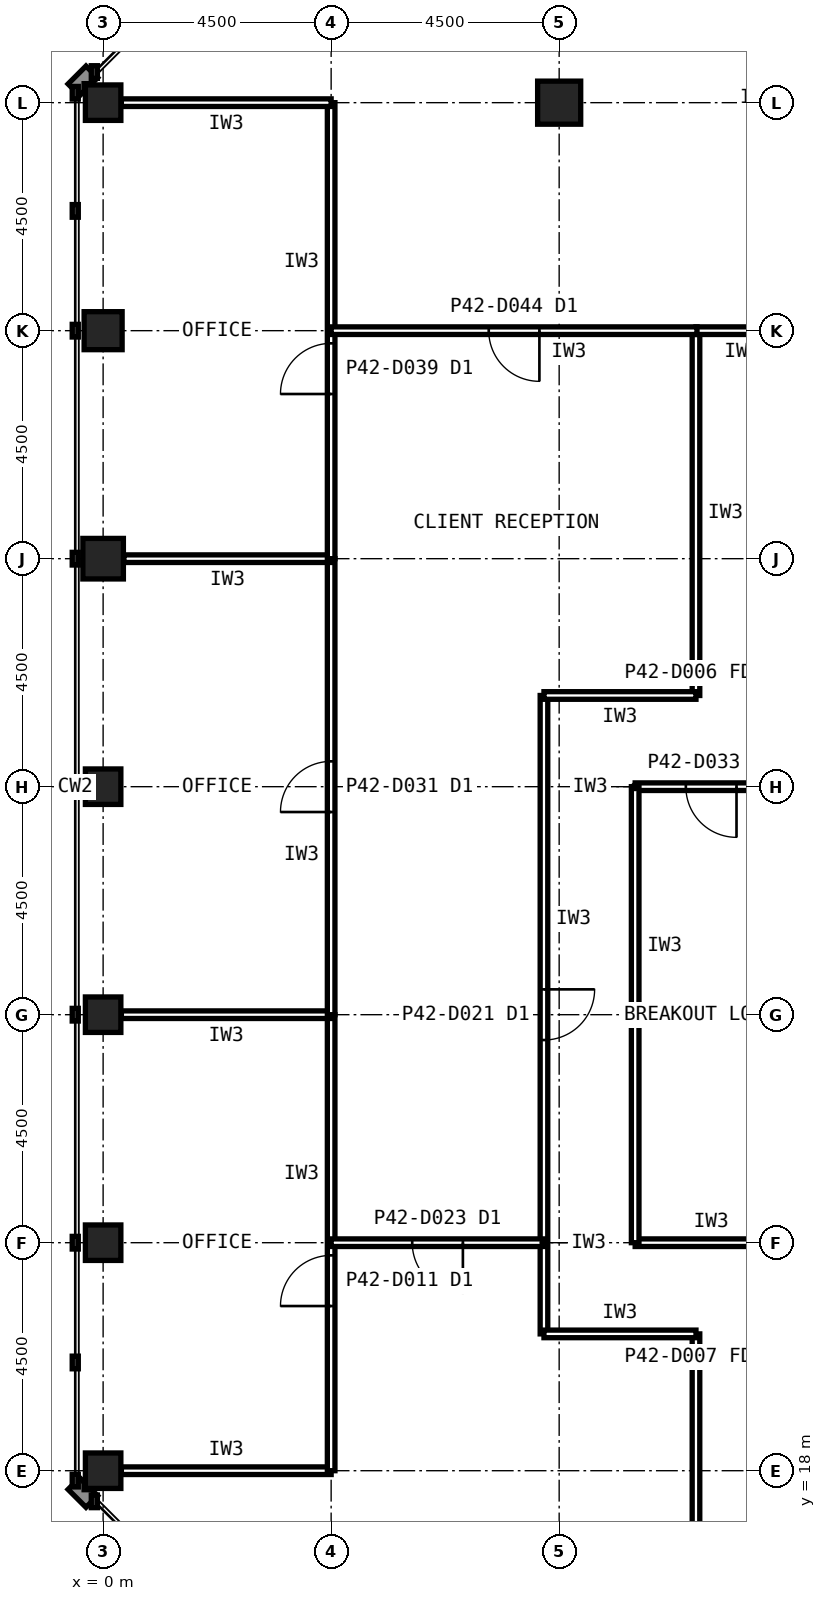
"""IFC4 building model, lengths in metres.
Left out: names, types, materials, properties, quantities, classifications, styles, units other than length and angle.
Written with IfcOpenShell. Run it as: python <this file> out.ifc"""

import sys

from ifc_helpers import new_model, si_unit, direction, frame, frame_2d, origin, origin_2d, place, context, subcontext, project, spatial, rectangle, hollow_rectangle, extrude, element, fill, save


model = new_model("IFC4")
c1 = context("Model", 3, precision=1e-05, world=origin(), true_north=direction((0.0, 1.0)))
c2 = subcontext(c1, "Body", "Model", "MODEL_VIEW")
j1 = project(units=[si_unit("LENGTHUNIT", "METRE"), si_unit("PLANEANGLEUNIT", "RADIAN")], contexts=[c1])
p1 = place(None, origin())
s1 = spatial("IfcSite", under=j1, at=p1, CompositionType="ELEMENT")
p2 = place(p1, origin())
s2 = spatial("IfcBuilding", under=s1, at=p2, CompositionType="ELEMENT")
p3 = place(p2, frame((0.0, 0.0, 175.6)))
s3 = spatial("IfcBuildingStorey", under=s2, at=p3, CompositionType="ELEMENT", Elevation=175.6)
p4 = place(p3, frame((0.0, 45.0, 0.0), z_axis=(0.0, 0.0, 1.0), x_axis=(1.0, 0.0, 0.0)))
e1 = element("IfcColumn", 1, at=p4, inside=s3, PredefinedType="COLUMN", context=c2, shape_type="SweptSolid", body=[
    extrude(hollow_rectangle(XDim=0.7, YDim=0.7, WallThickness=0.036, at=origin_2d()), origin(), (0.0, 0.0, 1.0), 4.0),
])
p5 = place(p3, frame((0.0, 40.5, 0.0), z_axis=(0.0, 0.0, 1.0), x_axis=(1.0, 0.0, 0.0)))
e2 = element("IfcColumn", 2, at=p5, inside=s3, PredefinedType="COLUMN", context=c2, shape_type="SweptSolid", body=[
    extrude(hollow_rectangle(XDim=0.75, YDim=0.75, WallThickness=0.04, at=origin_2d()), origin(), (0.0, 0.0, 1.0), 4.0),
])
p6 = place(p3, frame((0.0, 36.0, 0.0), z_axis=(0.0, 0.0, 1.0), x_axis=(1.0, 0.0, 0.0)))
e3 = element("IfcColumn", 3, at=p6, inside=s3, PredefinedType="COLUMN", context=c2, shape_type="SweptSolid", body=[
    extrude(hollow_rectangle(XDim=0.8, YDim=0.8, WallThickness=0.045, at=origin_2d()), origin(), (0.0, 0.0, 1.0), 4.0),
])
for number, where, z_axis, x_axis in (
    (4, (0.0, 31.5, 0.0), (0.0, 0.0, 1.0), (1.0, 0.0, 0.0)),
    (5, (0.0, 27.0, 0.0), (0.0, 0.0, 1.0), (1.0, 0.0, 0.0)),
    (6, (0.0, 22.5, 0.0), (0.0, 0.0, 1.0), (1.0, 0.0, 0.0)),
    (7, (0.0, 18.0, 0.0), (0.0, 0.0, 1.0), (1.0, 0.0, 0.0)),
):
    element("IfcColumn", number, at=place(p3, frame(where, z_axis=z_axis, x_axis=x_axis)), inside=s3, PredefinedType="COLUMN", context=c2, shape_type="SweptSolid", body=[
        extrude(hollow_rectangle(XDim=0.7, YDim=0.7, WallThickness=0.036, at=origin_2d()), origin(), (0.0, 0.0, 1.0), 4.0),
    ])
p7 = place(p3, frame((9.0, 45.0, 0.0), z_axis=(0.0, 0.0, 1.0), x_axis=(1.0, 0.0, 0.0)))
e8 = element("IfcColumn", 8, at=p7, inside=s3, PredefinedType="COLUMN", context=c2, shape_type="SweptSolid", body=[
    extrude(hollow_rectangle(XDim=0.85, YDim=0.85, WallThickness=0.05, at=origin_2d()), origin(), (0.0, 0.0, 1.0), 4.0),
])
p8 = place(p3, frame((8.7, 33.3, 0.0), z_axis=(0.0, 0.0, 1.0), x_axis=(0.0, -1.0, 0.0)))
e9 = element("IfcWall", 9, at=p8, inside=s3, PredefinedType="PARTITIONING", context=c2, shape_type="SweptSolid", body=[
    extrude(rectangle(XDim=12.6, YDim=0.15, at=frame_2d((6.3, 0.0))), origin(), (0.0, 0.0, 1.0), 3.84),
])
p9 = place(p8, frame((5.8, 0.0, 0.0)))
e10 = element("IfcOpeningElement", 10, at=p9, cuts=e9, PredefinedType="OPENING", context=c2, shape_type="SweptSolid", body=[
    extrude(rectangle(XDim=1.0, YDim=2.1, at=frame_2d((0.5, 1.05))), frame((0.0, 0.085, 0.0), z_axis=(0.0, -1.0, 0.0), x_axis=(1.0, 0.0, 0.0)), (0.0, 0.0, 1.0), 0.17),
])
p10 = place(p3, frame((11.7, 20.7, 0.0), z_axis=(0.0, 0.0, 1.0), x_axis=(0.0, -1.0, 0.0)))
e11 = element("IfcWall", 11, at=p10, inside=s3, PredefinedType="PARTITIONING", context=c2, shape_type="SweptSolid", body=[
    extrude(rectangle(XDim=9.0, YDim=0.15, at=frame_2d((4.5, 0.0))), origin(), (0.0, 0.0, 1.0), 3.84),
])
p11 = place(p3, frame((11.7, 40.5, 0.0), z_axis=(0.0, 0.0, 1.0), x_axis=(0.0, -1.0, 0.0)))
e12 = element("IfcWall", 12, at=p11, inside=s3, PredefinedType="PARTITIONING", context=c2, shape_type="SweptSolid", body=[
    extrude(rectangle(XDim=7.2, YDim=0.15, at=frame_2d((3.6, 0.0))), origin(), (0.0, 0.0, 1.0), 3.84),
])
for number, where, z_axis, x_axis in (
    (13, (8.7, 20.7, 0.0), (0.0, 0.0, 1.0), (1.0, 0.0, 0.0)),
    (14, (11.7, 33.3, 0.0), (0.0, 0.0, 1.0), (-1.0, 0.0, 0.0)),
):
    element("IfcWall", number, at=place(p3, frame(where, z_axis=z_axis, x_axis=x_axis)), inside=s3, PredefinedType="PARTITIONING", context=c2, shape_type="SweptSolid", body=[
        extrude(rectangle(XDim=3.0, YDim=0.15, at=frame_2d((1.5, 0.0))), origin(), (0.0, 0.0, 1.0), 3.84),
    ])
p12 = place(p3, frame((13.51, 40.5, 0.0), z_axis=(0.0, 0.0, 1.0), x_axis=(-1.0, 0.0, 0.0)))
e15 = element("IfcWall", 15, at=p12, inside=s3, PredefinedType="PARTITIONING", context=c2, shape_type="SweptSolid", body=[
    extrude(rectangle(XDim=1.81, YDim=0.15, at=frame_2d((0.905, 0.0))), origin(), (0.0, 0.0, 1.0), 2.989),
])
p13 = place(p3, frame((0.36, 18.0, 0.0), z_axis=(0.0, 0.0, 1.0), x_axis=(1.0, 0.0, 0.0)))
e16 = element("IfcWall", 16, at=p13, inside=s3, PredefinedType="PARTITIONING", context=c2, shape_type="SweptSolid", body=[
    extrude(rectangle(XDim=4.14, YDim=0.15, at=frame_2d((2.07, 0.0))), origin(), (0.0, 0.0, 1.0), 2.989),
])
p14 = place(p3, frame((4.5, 18.0, 0.0), z_axis=(0.0, 0.0, 1.0), x_axis=(0.0, 1.0, 0.0)))
e17 = element("IfcWall", 17, at=p14, inside=s3, PredefinedType="PARTITIONING", context=c2, shape_type="SweptSolid", body=[
    extrude(rectangle(XDim=9.0, YDim=0.15, at=frame_2d((4.5, 0.0))), origin(), (0.0, 0.0, 1.0), 3.84),
])
p15 = place(p14, frame((3.25, 0.0, 0.0)))
e18 = element("IfcOpeningElement", 18, at=p15, cuts=e17, PredefinedType="OPENING", context=c2, shape_type="SweptSolid", body=[
    extrude(rectangle(XDim=1.0, YDim=2.1, at=frame_2d((0.5, 1.05))), frame((0.0, 0.085, 0.0), z_axis=(0.0, -1.0, 0.0), x_axis=(1.0, 0.0, 0.0)), (0.0, 0.0, 1.0), 0.17),
])
p16 = place(p3, frame((4.5, 27.0, 0.0), z_axis=(0.0, 0.0, 1.0), x_axis=(-1.0, 0.0, 0.0)))
e19 = element("IfcWall", 19, at=p16, inside=s3, PredefinedType="PARTITIONING", context=c2, shape_type="SweptSolid", body=[
    extrude(rectangle(XDim=4.14, YDim=0.15, at=frame_2d((2.07, 0.0))), origin(), (0.0, 0.0, 1.0), 2.989),
])
p17 = place(p3, frame((4.5, 27.0, 0.0), z_axis=(0.0, 0.0, 1.0), x_axis=(0.0, 1.0, 0.0)))
e20 = element("IfcWall", 20, at=p17, inside=s3, PredefinedType="PARTITIONING", context=c2, shape_type="SweptSolid", body=[
    extrude(rectangle(XDim=9.0, YDim=0.15, at=frame_2d((4.5, 0.0))), origin(), (0.0, 0.0, 1.0), 3.84),
])
p18 = place(p17, frame((4.0, 0.0, 0.0)))
e21 = element("IfcOpeningElement", 21, at=p18, cuts=e20, PredefinedType="OPENING", context=c2, shape_type="SweptSolid", body=[
    extrude(rectangle(XDim=1.0, YDim=2.1, at=frame_2d((0.5, 1.05))), frame((0.0, 0.085, 0.0), z_axis=(0.0, -1.0, 0.0), x_axis=(1.0, 0.0, 0.0)), (0.0, 0.0, 1.0), 0.17),
])
p19 = place(p3, frame((4.5, 36.0, 0.0), z_axis=(0.0, 0.0, 1.0), x_axis=(-1.0, 0.0, 0.0)))
e22 = element("IfcWall", 22, at=p19, inside=s3, PredefinedType="PARTITIONING", context=c2, shape_type="SweptSolid", body=[
    extrude(rectangle(XDim=4.09, YDim=0.15, at=frame_2d((2.045, 0.0))), origin(), (0.0, 0.0, 1.0), 2.989),
])
p20 = place(p3, frame((4.5, 36.0, 0.0), z_axis=(0.0, 0.0, 1.0), x_axis=(0.0, 1.0, 0.0)))
e23 = element("IfcWall", 23, at=p20, inside=s3, PredefinedType="PARTITIONING", context=c2, shape_type="SweptSolid", body=[
    extrude(rectangle(XDim=9.0, YDim=0.15, at=frame_2d((4.5, 0.0))), origin(), (0.0, 0.0, 1.0), 3.84),
])
p21 = place(p20, frame((3.25, 0.0, 0.0)))
e24 = element("IfcOpeningElement", 24, at=p21, cuts=e23, PredefinedType="OPENING", context=c2, shape_type="SweptSolid", body=[
    extrude(rectangle(XDim=1.0, YDim=2.1, at=frame_2d((0.5, 1.05))), frame((0.0, 0.085, 0.0), z_axis=(0.0, -1.0, 0.0), x_axis=(1.0, 0.0, 0.0)), (0.0, 0.0, 1.0), 0.17),
])
p22 = place(p3, frame((4.5, 45.0, 0.0), z_axis=(0.0, 0.0, 1.0), x_axis=(-1.0, 0.0, 0.0)))
e25 = element("IfcWall", 25, at=p22, inside=s3, PredefinedType="PARTITIONING", context=c2, shape_type="SweptSolid", body=[
    extrude(rectangle(XDim=4.14, YDim=0.15, at=frame_2d((2.07, 0.0))), origin(), (0.0, 0.0, 1.0), 3.229),
])
p23 = place(p3, frame((10.5, 22.5, 0.0), z_axis=(0.0, 0.0, 1.0), x_axis=(1.0, 0.0, 0.0)))
e26 = element("IfcWall", 26, at=p23, inside=s3, PredefinedType="PARTITIONING", context=c2, shape_type="SweptSolid", body=[
    extrude(rectangle(XDim=3.0, YDim=0.15, at=frame_2d((1.5, 0.0))), origin(), (0.0, 0.0, 1.0), 2.989),
])
p24 = place(p3, frame((13.5, 31.5, 0.0), z_axis=(0.0, 0.0, 1.0), x_axis=(-1.0, 0.0, 0.0)))
e27 = element("IfcWall", 27, at=p24, inside=s3, PredefinedType="PARTITIONING", context=c2, shape_type="SweptSolid", body=[
    extrude(rectangle(XDim=3.0, YDim=0.15, at=frame_2d((1.5, 0.0))), origin(), (0.0, 0.0, 1.0), 2.989),
])
p25 = place(p24, frame((1.0, 0.0, 0.0)))
e28 = element("IfcOpeningElement", 28, at=p25, cuts=e27, PredefinedType="OPENING", context=c2, shape_type="SweptSolid", body=[
    extrude(rectangle(XDim=1.0, YDim=2.1, at=frame_2d((0.5, 1.05))), frame((0.0, 0.085, 0.0), z_axis=(0.0, -1.0, 0.0), x_axis=(1.0, 0.0, 0.0)), (0.0, 0.0, 1.0), 0.17),
])
p26 = place(p3, frame((10.5, 31.5, 0.0), z_axis=(0.0, 0.0, 1.0), x_axis=(0.0, -1.0, 0.0)))
e29 = element("IfcWall", 29, at=p26, inside=s3, PredefinedType="PARTITIONING", context=c2, shape_type="SweptSolid", body=[
    extrude(rectangle(XDim=9.0, YDim=0.15, at=frame_2d((4.5, 0.0))), origin(), (0.0, 0.0, 1.0), 3.84),
])
p27 = place(p3, frame((11.72, 40.5, 0.0), z_axis=(0.0, 0.0, 1.0), x_axis=(-1.0, 0.0, 0.0)))
e30 = element("IfcWall", 30, at=p27, inside=s3, PredefinedType="PARTITIONING", context=c2, shape_type="SweptSolid", body=[
    extrude(rectangle(XDim=7.22, YDim=0.15, at=frame_2d((3.61, 0.0))), origin(), (0.0, 0.0, 1.0), 2.989),
])
p28 = place(p27, frame((3.11, 0.0, 0.0)))
e31 = element("IfcOpeningElement", 31, at=p28, cuts=e30, PredefinedType="OPENING", context=c2, shape_type="SweptSolid", body=[
    extrude(rectangle(XDim=1.0, YDim=2.1, at=frame_2d((0.5, 1.05))), frame((0.0, 0.085, 0.0), z_axis=(0.0, -1.0, 0.0), x_axis=(1.0, 0.0, 0.0)), (0.0, 0.0, 1.0), 0.17),
])
p29 = place(p3, frame((8.7, 22.5, 0.0), z_axis=(0.0, 0.0, 1.0), x_axis=(-1.0, 0.0, 0.0)))
e32 = element("IfcWall", 32, at=p29, inside=s3, PredefinedType="PARTITIONING", context=c2, shape_type="SweptSolid", body=[
    extrude(rectangle(XDim=4.2, YDim=0.15, at=frame_2d((2.1, 0.0))), origin(), (0.0, 0.0, 1.0), 2.989),
])
p30 = place(p29, frame((1.6, 0.0, 0.0)))
e33 = element("IfcOpeningElement", 33, at=p30, cuts=e32, PredefinedType="OPENING", context=c2, shape_type="SweptSolid", body=[
    extrude(rectangle(XDim=1.0, YDim=2.1, at=frame_2d((0.5, 1.05))), frame((0.0, 0.085, 0.0), z_axis=(0.0, -1.0, 0.0), x_axis=(1.0, 0.0, 0.0)), (0.0, 0.0, 1.0), 0.17),
])
p31 = place(p9, origin())
e34 = element("IfcDoor", 34, at=p31, inside=s3, OperationType="SINGLE_SWING_LEFT", PredefinedType="DOOR", context=c2, shape_type="SweptSolid", body=[
    extrude(rectangle(XDim=1.0, YDim=2.1, at=frame_2d((0.5, 1.05))), frame((0.0, 0.025, 0.0), z_axis=(0.0, -1.0, 0.0), x_axis=(1.0, 0.0, 0.0)), (0.0, 0.0, 1.0), 0.05),
])
fill(e10, e34)
p32 = place(p15, origin())
e35 = element("IfcDoor", 35, at=p32, inside=s3, OperationType="SINGLE_SWING_LEFT", PredefinedType="DOOR", context=c2, shape_type="SweptSolid", body=[
    extrude(rectangle(XDim=1.0, YDim=2.1, at=frame_2d((0.5, 1.05))), frame((0.0, 0.025, 0.0), z_axis=(0.0, -1.0, 0.0), x_axis=(1.0, 0.0, 0.0)), (0.0, 0.0, 1.0), 0.05),
])
fill(e18, e35)
p33 = place(p18, origin())
e36 = element("IfcDoor", 36, at=p33, inside=s3, OperationType="SINGLE_SWING_LEFT", PredefinedType="DOOR", context=c2, shape_type="SweptSolid", body=[
    extrude(rectangle(XDim=1.0, YDim=2.1, at=frame_2d((0.5, 1.05))), frame((0.0, 0.025, 0.0), z_axis=(0.0, -1.0, 0.0), x_axis=(1.0, 0.0, 0.0)), (0.0, 0.0, 1.0), 0.05),
])
fill(e21, e36)
p34 = place(p21, origin())
e37 = element("IfcDoor", 37, at=p34, inside=s3, OperationType="SINGLE_SWING_LEFT", PredefinedType="DOOR", context=c2, shape_type="SweptSolid", body=[
    extrude(rectangle(XDim=1.0, YDim=2.1, at=frame_2d((0.5, 1.05))), frame((0.0, 0.025, 0.0), z_axis=(0.0, -1.0, 0.0), x_axis=(1.0, 0.0, 0.0)), (0.0, 0.0, 1.0), 0.05),
])
fill(e24, e37)
p35 = place(p25, origin())
e38 = element("IfcDoor", 38, at=p35, inside=s3, OperationType="SINGLE_SWING_LEFT", PredefinedType="DOOR", context=c2, shape_type="SweptSolid", body=[
    extrude(rectangle(XDim=1.0, YDim=2.1, at=frame_2d((0.5, 1.05))), frame((0.0, 0.025, 0.0), z_axis=(0.0, -1.0, 0.0), x_axis=(1.0, 0.0, 0.0)), (0.0, 0.0, 1.0), 0.05),
])
fill(e28, e38)
p36 = place(p28, origin())
e39 = element("IfcDoor", 39, at=p36, inside=s3, OperationType="SINGLE_SWING_LEFT", PredefinedType="DOOR", context=c2, shape_type="SweptSolid", body=[
    extrude(rectangle(XDim=1.0, YDim=2.1, at=frame_2d((0.5, 1.05))), frame((0.0, 0.025, 0.0), z_axis=(0.0, -1.0, 0.0), x_axis=(1.0, 0.0, 0.0)), (0.0, 0.0, 1.0), 0.05),
])
fill(e31, e39)
p37 = place(p30, origin())
e40 = element("IfcDoor", 40, at=p37, inside=s3, OperationType="SINGLE_SWING_LEFT", PredefinedType="DOOR", context=c2, shape_type="SweptSolid", body=[
    extrude(rectangle(XDim=1.0, YDim=2.1, at=frame_2d((0.5, 1.05))), frame((0.0, 0.025, 0.0), z_axis=(0.0, -1.0, 0.0), x_axis=(1.0, 0.0, 0.0)), (0.0, 0.0, 1.0), 0.05),
])
fill(e33, e40)
save(model, sys.argv[1])
